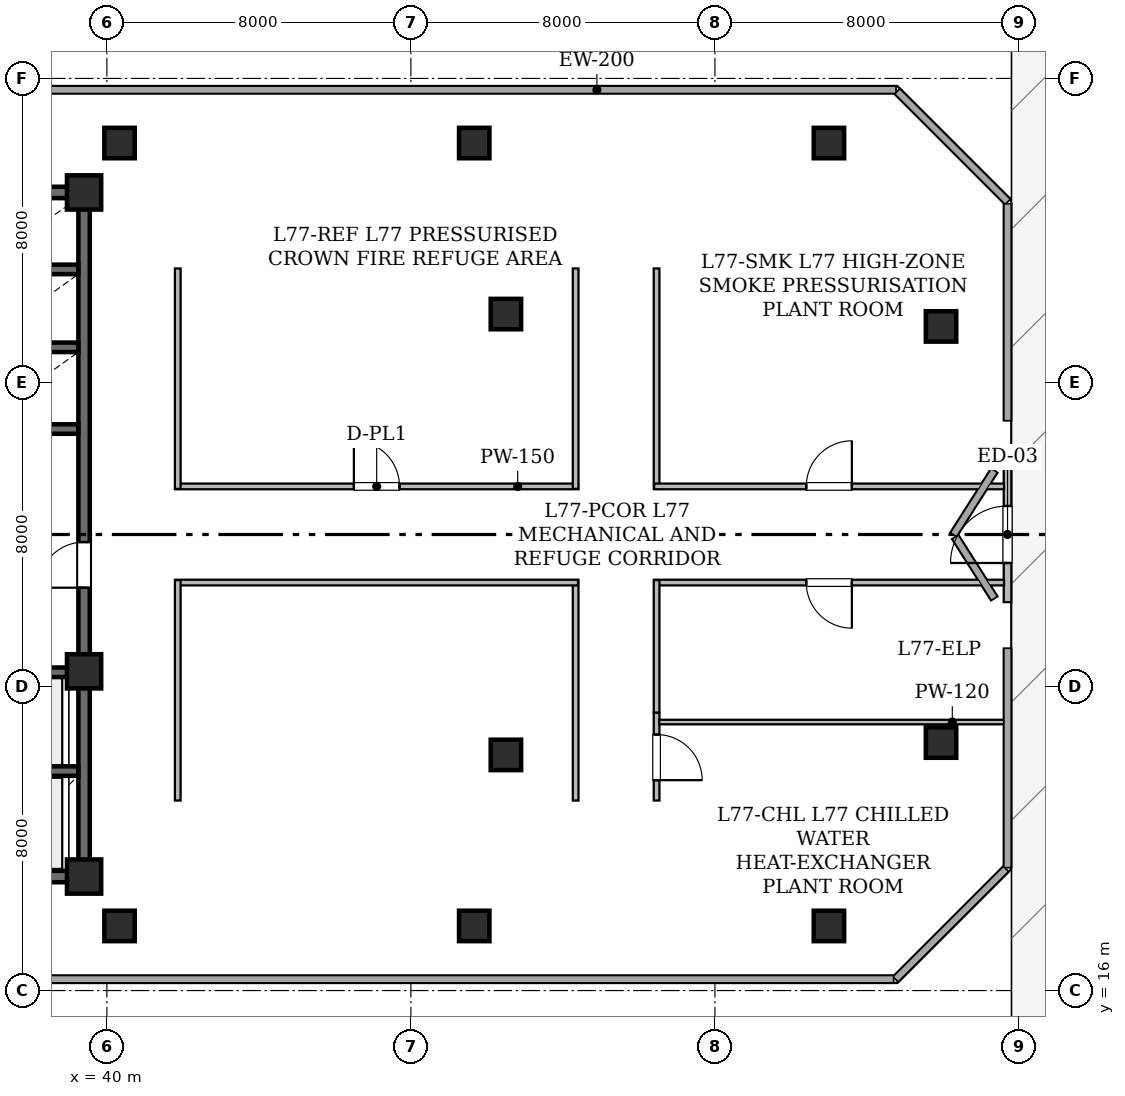
"""IFC4 building model, lengths in metres.
Left out: names, types, materials, properties, quantities, classifications, styles, units other than length and angle.
Written with IfcOpenShell. Run it as: python <this file> out.ifc"""

import sys

from ifc_helpers import new_model, si_unit, direction, frame, frame_2d, origin, origin_2d, place, context, subcontext, project, spatial, rectangle, hollow_rectangle, extrude, element, fill, save


model = new_model("IFC4")
c1 = context("Model", 3, precision=1e-05, world=origin(), true_north=direction((0.0, 1.0)))
c2 = subcontext(c1, "Body", "Model", "MODEL_VIEW")
j1 = project(units=[si_unit("LENGTHUNIT", "METRE"), si_unit("PLANEANGLEUNIT", "RADIAN")], contexts=[c1])
p1 = place(None, origin())
s1 = spatial("IfcSite", under=j1, at=p1, CompositionType="ELEMENT")
p2 = place(p1, origin())
s2 = spatial("IfcBuilding", under=s1, at=p2, CompositionType="ELEMENT")
p3 = place(p2, frame((0.0, 0.0, 303.05)))
s3 = spatial("IfcBuildingStorey", under=s2, at=p3, CompositionType="ELEMENT", Elevation=303.05)
for number, where, z_axis, x_axis in (
    (1, (39.4, 19.0, 0.0), (0.0, 0.0, 1.0), (1.0, 0.0, 0.0)),
    (2, (39.4, 24.4, 0.0), (0.0, 0.0, 1.0), (1.0, 0.0, 0.0)),
    (3, (39.4, 37.0, 0.0), (0.0, 0.0, 1.0), (1.0, 0.0, 0.0)),
):
    element("IfcColumn", number, at=place(p3, frame(where, z_axis=z_axis, x_axis=x_axis)), inside=s3, PredefinedType="COLUMN", context=c2, shape_type="SweptSolid", body=[
        extrude(hollow_rectangle(XDim=0.9, YDim=0.9, WallThickness=0.045, at=origin_2d()), origin(), (0.0, 0.0, 1.0), 4.8),
    ])
for number, where, z_axis, x_axis in (
    (4, (40.333, 17.7, 0.0), (0.0, 0.0, 1.0), (1.0, 0.0, 0.0)),
    (5, (49.667, 17.7, 0.0), (0.0, 0.0, 1.0), (1.0, 0.0, 0.0)),
    (6, (59.0, 17.7, 0.0), (0.0, 0.0, 1.0), (1.0, 0.0, 0.0)),
    (7, (40.333, 38.3, 0.0), (0.0, 0.0, 1.0), (1.0, 0.0, 0.0)),
    (8, (49.667, 38.3, 0.0), (0.0, 0.0, 1.0), (1.0, 0.0, 0.0)),
    (9, (59.0, 38.3, 0.0), (0.0, 0.0, 1.0), (1.0, 0.0, 0.0)),
    (10, (61.95, 22.525, 0.0), (0.0, 0.0, 1.0), (1.0, 0.0, 0.0)),
    (11, (61.95, 33.475, 0.0), (0.0, 0.0, 1.0), (1.0, 0.0, 0.0)),
    (12, (50.5, 22.2, 0.0), (0.0, 0.0, 1.0), (1.0, 0.0, 0.0)),
    (13, (50.5, 33.8, 0.0), (0.0, 0.0, 1.0), (1.0, 0.0, 0.0)),
):
    element("IfcColumn", number, at=place(p3, frame(where, z_axis=z_axis, x_axis=x_axis)), inside=s3, PredefinedType="COLUMN", context=c2, shape_type="SweptSolid", body=[
        extrude(hollow_rectangle(XDim=0.8, YDim=0.8, WallThickness=0.04, at=origin_2d()), origin(), (0.0, 0.0, 1.0), 4.8),
    ])
p4 = place(p3, frame((29.302, 39.7, 0.0), z_axis=(0.0, 0.0, 1.0), x_axis=(1.0, 0.0, 0.0)))
e14 = element("IfcWall", 14, at=p4, inside=s3, PredefinedType="STANDARD", context=c2, shape_type="SweptSolid", body=[
    extrude(rectangle(XDim=31.457, YDim=0.2, at=frame_2d((15.729, 0.0))), origin(), (0.0, 0.0, 1.0), 1.15),
])
p5 = place(p3, frame((60.803, 39.656, 0.0), z_axis=(0.0, 0.0, 1.0), x_axis=(0.707106781187, -0.707106781187, 0.0)))
e15 = element("IfcWall", 15, at=p5, inside=s3, PredefinedType="STANDARD", context=c2, shape_type="SweptSolid", body=[
    extrude(rectangle(XDim=4.097, YDim=0.2, at=frame_2d((2.048, 0.0))), origin(), (0.0, 0.0, 1.0), 1.15),
])
p6 = place(p3, frame((63.7, 36.696, 0.0), z_axis=(0.0, 0.0, 1.0), x_axis=(0.0, -1.0, 0.0)))
e16 = element("IfcWall", 16, at=p6, inside=s3, PredefinedType="STANDARD", context=c2, shape_type="SweptSolid", body=[
    extrude(rectangle(XDim=5.696, YDim=0.2, at=frame_2d((2.848, 0.0))), origin(), (0.0, 0.0, 1.0), 1.15),
])
p7 = place(p3, frame((63.35, 29.679, 0.0), z_axis=(0.0, 0.0, 1.0), x_axis=(-0.537113569059, -0.843509937068, 0.0)))
e17 = element("IfcWall", 17, at=p7, inside=s3, PredefinedType="STANDARD", context=c2, shape_type="SweptSolid", body=[
    extrude(rectangle(XDim=1.99, YDim=0.2, at=frame_2d((0.995, 0.0))), origin(), (0.0, 0.0, 1.0), 1.15),
])
p8 = place(p3, frame((62.325, 27.931, 0.0), z_axis=(0.0, 0.0, 1.0), x_axis=(0.537132057912, -0.843498163818, 0.0)))
e18 = element("IfcWall", 18, at=p8, inside=s3, PredefinedType="STANDARD", context=c2, shape_type="SweptSolid", body=[
    extrude(rectangle(XDim=1.908, YDim=0.2, at=frame_2d((0.954, 0.0))), origin(), (0.0, 0.0, 1.0), 1.15),
])
p9 = place(p3, frame((63.7, 25.0, 0.0), z_axis=(0.0, 0.0, 1.0), x_axis=(0.0, -1.0, 0.0)))
e19 = element("IfcWall", 19, at=p9, inside=s3, PredefinedType="STANDARD", context=c2, shape_type="SweptSolid", body=[
    extrude(rectangle(XDim=5.759, YDim=0.2, at=frame_2d((2.879, 0.0))), origin(), (0.0, 0.0, 1.0), 1.15),
])
p10 = place(p3, frame((63.655, 19.196, 0.0), z_axis=(0.0, 0.0, 1.0), x_axis=(-0.707106781187, -0.707106781187, 0.0)))
e20 = element("IfcWall", 20, at=p10, inside=s3, PredefinedType="STANDARD", context=c2, shape_type="SweptSolid", body=[
    extrude(rectangle(XDim=4.095, YDim=0.2, at=frame_2d((2.048, 0.0))), origin(), (0.0, 0.0, 1.0), 1.15),
])
p11 = place(p3, frame((60.696, 16.3, 0.0), z_axis=(0.0, 0.0, 1.0), x_axis=(-1.0, 0.0, 0.0)))
e21 = element("IfcWall", 21, at=p11, inside=s3, PredefinedType="STANDARD", context=c2, shape_type="SweptSolid", body=[
    extrude(rectangle(XDim=31.393, YDim=0.2, at=frame_2d((15.697, 0.0))), origin(), (0.0, 0.0, 1.0), 1.15),
])
p12 = place(p3, frame((63.7, 26.22, 0.0), z_axis=(0.0, 0.0, 1.0), x_axis=(0.0, 1.0, 0.0)))
e22 = element("IfcWall", 22, at=p12, inside=s3, PredefinedType="STANDARD", context=c2, shape_type="SweptSolid", body=[
    extrude(rectangle(XDim=3.56, YDim=0.2, at=frame_2d((1.78, 0.0))), origin(), (0.0, 0.0, 1.0), 4.55),
])
p13 = place(p12, frame((1.03, 0.0, 0.0)))
e23 = element("IfcOpeningElement", 23, at=p13, cuts=e22, PredefinedType="OPENING", context=c2, shape_type="SweptSolid", body=[
    extrude(rectangle(XDim=1.5, YDim=2.2, at=frame_2d((0.75, 1.1))), frame((0.0, 0.11, 0.0), z_axis=(0.0, -1.0, 0.0), x_axis=(1.0, 0.0, 0.0)), (0.0, 0.0, 1.0), 0.22),
])
p14 = place(p3, frame((29.0, 19.0, 0.0), z_axis=(0.0, 0.0, 1.0), x_axis=(1.0, 0.0, 0.0)))
e24 = element("IfcWall", 24, at=p14, inside=s3, PredefinedType="SHEAR", context=c2, shape_type="SweptSolid", body=[
    extrude(rectangle(XDim=10.4, YDim=0.3, at=frame_2d((5.2, 0.0))), origin(), (0.0, 0.0, 1.0), 4.55),
])
p15 = place(p14, frame((4.9, 0.0, 0.0)))
e25 = element("IfcOpeningElement", 25, at=p15, cuts=e24, PredefinedType="OPENING", context=c2, shape_type="SweptSolid", body=[
    extrude(rectangle(XDim=1.2, YDim=2.15, at=frame_2d((0.6, 1.075))), frame((0.0, 0.16, 0.0), z_axis=(0.0, -1.0, 0.0), x_axis=(1.0, 0.0, 0.0)), (0.0, 0.0, 1.0), 0.32),
])
p16 = place(p3, frame((29.0, 37.0, 0.0), z_axis=(0.0, 0.0, 1.0), x_axis=(1.0, 0.0, 0.0)))
e26 = element("IfcWall", 26, at=p16, inside=s3, PredefinedType="SHEAR", context=c2, shape_type="SweptSolid", body=[
    extrude(rectangle(XDim=10.4, YDim=0.3, at=frame_2d((5.2, 0.0))), origin(), (0.0, 0.0, 1.0), 4.55),
])
p17 = place(p16, frame((5.14, 0.0, 0.0)))
e27 = element("IfcOpeningElement", 27, at=p17, cuts=e26, PredefinedType="OPENING", context=c2, shape_type="SweptSolid", body=[
    extrude(rectangle(XDim=1.15, YDim=2.2, at=frame_2d((0.575, 1.1))), frame((0.0, 0.16, 0.0), z_axis=(0.0, -1.0, 0.0), x_axis=(1.0, 0.0, 0.0)), (0.0, 0.0, 1.0), 0.32),
])
p18 = place(p3, frame((39.4, 19.0, 0.0), z_axis=(0.0, 0.0, 1.0), x_axis=(0.0, 1.0, 0.0)))
e28 = element("IfcWall", 28, at=p18, inside=s3, PredefinedType="SHEAR", context=c2, shape_type="SweptSolid", body=[
    extrude(rectangle(XDim=5.4, YDim=0.3, at=frame_2d((2.7, 0.0))), origin(), (0.0, 0.0, 1.0), 4.55),
])
p19 = place(p3, frame((39.4, 24.4, 0.0), z_axis=(0.0, 0.0, 1.0), x_axis=(0.0, 1.0, 0.0)))
e29 = element("IfcWall", 29, at=p19, inside=s3, PredefinedType="SHEAR", context=c2, shape_type="SweptSolid", body=[
    extrude(rectangle(XDim=12.6, YDim=0.3, at=frame_2d((6.3, 0.0))), origin(), (0.0, 0.0, 1.0), 4.55),
])
p20 = place(p19, frame((2.2, 0.0, 0.0)))
e30 = element("IfcOpeningElement", 30, at=p20, cuts=e29, PredefinedType="OPENING", context=c2, shape_type="SweptSolid", body=[
    extrude(rectangle(XDim=1.2, YDim=2.15, at=frame_2d((0.6, 1.075))), frame((0.0, 0.16, 0.0), z_axis=(0.0, -1.0, 0.0), x_axis=(1.0, 0.0, 0.0)), (0.0, 0.0, 1.0), 0.32),
])
for number, where, z_axis, x_axis in (
    (31, (36.604, 21.775, 0.0), (0.0, 0.0, 1.0), (1.0, 0.0, 0.0)),
    (32, (36.604, 24.375, 0.0), (0.0, 0.0, 1.0), (1.0, 0.0, 0.0)),
):
    element("IfcWall", number, at=place(p3, frame(where, z_axis=z_axis, x_axis=x_axis)), inside=s3, PredefinedType="SHEAR", context=c2, shape_type="SweptSolid", body=[
        extrude(rectangle(XDim=2.642, YDim=0.25, at=frame_2d((1.321, 0.0))), origin(), (0.0, 0.0, 1.0), 4.55),
    ])
p21 = place(p3, frame((36.904, 30.775, 0.0), z_axis=(0.0, 0.0, 1.0), x_axis=(1.0, 0.0, 0.0)))
e33 = element("IfcWall", 33, at=p21, inside=s3, PredefinedType="SHEAR", context=c2, shape_type="SweptSolid", body=[
    extrude(rectangle(XDim=2.342, YDim=0.25, at=frame_2d((1.171, 0.0))), origin(), (0.0, 0.0, 1.0), 4.55),
])
for number, where, z_axis, x_axis in (
    (34, (36.604, 32.925, 0.0), (0.0, 0.0, 1.0), (1.0, 0.0, 0.0)),
    (35, (36.604, 34.975, 0.0), (0.0, 0.0, 1.0), (1.0, 0.0, 0.0)),
):
    element("IfcWall", number, at=place(p3, frame(where, z_axis=z_axis, x_axis=x_axis)), inside=s3, PredefinedType="SHEAR", context=c2, shape_type="SweptSolid", body=[
        extrude(rectangle(XDim=2.642, YDim=0.25, at=frame_2d((1.321, 0.0))), origin(), (0.0, 0.0, 1.0), 4.55),
    ])
p22 = place(p3, frame((41.8, 29.265, 0.0), z_axis=(0.0, 0.0, 1.0), x_axis=(1.0, 0.0, 0.0)))
e36 = element("IfcWall", 36, at=p22, inside=s3, PredefinedType="STANDARD", context=c2, shape_type="SweptSolid", body=[
    extrude(rectangle(XDim=10.6, YDim=0.15, at=frame_2d((5.3, 0.0))), origin(), (0.0, 0.0, 1.0), 3.845),
])
p23 = place(p22, frame((4.7, 0.0, 0.0)))
e37 = element("IfcOpeningElement", 37, at=p23, cuts=e36, PredefinedType="OPENING", context=c2, shape_type="SweptSolid", body=[
    extrude(rectangle(XDim=1.2, YDim=2.15, at=frame_2d((0.6, 1.075))), frame((0.0, 0.085, 0.0), z_axis=(0.0, -1.0, 0.0), x_axis=(1.0, 0.0, 0.0)), (0.0, 0.0, 1.0), 0.17),
])
for number, where, z_axis, x_axis in (
    (38, (52.335, 29.2, 0.0), (0.0, 0.0, 1.0), (0.0, 1.0, 0.0)),
    (39, (52.335, 21.0, 0.0), (0.0, 0.0, 1.0), (0.0, 1.0, 0.0)),
):
    element("IfcWall", number, at=place(p3, frame(where, z_axis=z_axis, x_axis=x_axis)), inside=s3, PredefinedType="STANDARD", context=c2, shape_type="SweptSolid", body=[
        extrude(rectangle(XDim=5.8, YDim=0.15, at=frame_2d((2.9, 0.0))), origin(), (0.0, 0.0, 1.0), 3.845),
    ])
p24 = place(p3, frame((52.398, 26.735, 0.0), z_axis=(0.0, 0.0, 1.0), x_axis=(-1.0, 0.0, 0.0)))
e40 = element("IfcWall", 40, at=p24, inside=s3, PredefinedType="STANDARD", context=c2, shape_type="SweptSolid", body=[
    extrude(rectangle(XDim=10.598, YDim=0.15, at=frame_2d((5.299, 0.0))), origin(), (0.0, 0.0, 1.0), 3.845),
])
p25 = place(p3, frame((41.865, 26.8, 0.0), z_axis=(0.0, 0.0, 1.0), x_axis=(0.0, -1.0, 0.0)))
e41 = element("IfcWall", 41, at=p25, inside=s3, PredefinedType="STANDARD", context=c2, shape_type="SweptSolid", body=[
    extrude(rectangle(XDim=5.8, YDim=0.15, at=frame_2d((2.9, 0.0))), origin(), (0.0, 0.0, 1.0), 3.845),
])
p26 = place(p3, frame((41.865, 35.0, 0.0), z_axis=(0.0, 0.0, 1.0), x_axis=(0.0, -1.0, 0.0)))
e42 = element("IfcWall", 42, at=p26, inside=s3, PredefinedType="STANDARD", context=c2, shape_type="SweptSolid", body=[
    extrude(rectangle(XDim=5.8, YDim=0.15, at=frame_2d((2.9, 0.0))), origin(), (0.0, 0.0, 1.0), 4.55),
])
p27 = place(p3, frame((54.465, 23.314, 0.0), z_axis=(0.0, 0.0, 1.0), x_axis=(0.0, -1.0, 0.0)))
e43 = element("IfcWall", 43, at=p27, inside=s3, PredefinedType="STANDARD", context=c2, shape_type="SweptSolid", body=[
    extrude(rectangle(XDim=2.314, YDim=0.15, at=frame_2d((1.157, 0.0))), origin(), (0.0, 0.0, 1.0), 3.845),
])
p28 = place(p27, frame((0.578, 0.0, 0.0)))
e44 = element("IfcOpeningElement", 44, at=p28, cuts=e43, PredefinedType="OPENING", context=c2, shape_type="SweptSolid", body=[
    extrude(rectangle(XDim=1.2, YDim=2.15, at=frame_2d((0.6, 1.075))), frame((0.0, 0.085, 0.0), z_axis=(0.0, -1.0, 0.0), x_axis=(1.0, 0.0, 0.0)), (0.0, 0.0, 1.0), 0.17),
])
p29 = place(p3, frame((63.608, 26.735, 0.0), z_axis=(0.0, 0.0, 1.0), x_axis=(-1.0, 0.0, 0.0)))
e45 = element("IfcWall", 45, at=p29, inside=s3, PredefinedType="STANDARD", context=c2, shape_type="SweptSolid", body=[
    extrude(rectangle(XDim=9.208, YDim=0.15, at=frame_2d((4.604, 0.0))), origin(), (0.0, 0.0, 1.0), 4.007),
])
p30 = place(p29, frame((4.004, 0.0, 0.0)))
e46 = element("IfcOpeningElement", 46, at=p30, cuts=e45, PredefinedType="OPENING", context=c2, shape_type="SweptSolid", body=[
    extrude(rectangle(XDim=1.2, YDim=2.15, at=frame_2d((0.6, 1.075))), frame((0.0, 0.085, 0.0), z_axis=(0.0, -1.0, 0.0), x_axis=(1.0, 0.0, 0.0)), (0.0, 0.0, 1.0), 0.17),
])
p31 = place(p3, frame((54.465, 26.8, 0.0), z_axis=(0.0, 0.0, 1.0), x_axis=(0.0, -1.0, 0.0)))
e47 = element("IfcWall", 47, at=p31, inside=s3, PredefinedType="STANDARD", context=c2, shape_type="SweptSolid", body=[
    extrude(rectangle(XDim=3.486, YDim=0.15, at=frame_2d((1.743, 0.0))), origin(), (0.0, 0.0, 1.0), 4.55),
])
p32 = place(p3, frame((54.465, 35.0, 0.0), z_axis=(0.0, 0.0, 1.0), x_axis=(0.0, -1.0, 0.0)))
e48 = element("IfcWall", 48, at=p32, inside=s3, PredefinedType="STANDARD", context=c2, shape_type="SweptSolid", body=[
    extrude(rectangle(XDim=5.8, YDim=0.15, at=frame_2d((2.9, 0.0))), origin(), (0.0, 0.0, 1.0), 3.845),
])
p33 = place(p3, frame((54.4, 29.265, 0.0), z_axis=(0.0, 0.0, 1.0), x_axis=(1.0, 0.0, 0.0)))
e49 = element("IfcWall", 49, at=p33, inside=s3, PredefinedType="STANDARD", context=c2, shape_type="SweptSolid", body=[
    extrude(rectangle(XDim=9.208, YDim=0.15, at=frame_2d((4.604, 0.0))), origin(), (0.0, 0.0, 1.0), 4.007),
])
p34 = place(p33, frame((4.004, 0.0, 0.0)))
e50 = element("IfcOpeningElement", 50, at=p34, cuts=e49, PredefinedType="OPENING", context=c2, shape_type="SweptSolid", body=[
    extrude(rectangle(XDim=1.2, YDim=2.15, at=frame_2d((0.6, 1.075))), frame((0.0, 0.085, 0.0), z_axis=(0.0, -1.0, 0.0), x_axis=(1.0, 0.0, 0.0)), (0.0, 0.0, 1.0), 0.17),
])
p35 = place(p3, frame((54.532, 23.065, 0.0), z_axis=(0.0, 0.0, 1.0), x_axis=(1.0, 0.0, 0.0)))
e51 = element("IfcWall", 51, at=p35, inside=s3, PredefinedType="PARTITIONING", context=c2, shape_type="SweptSolid", body=[
    extrude(rectangle(XDim=9.076, YDim=0.12, at=frame_2d((4.538, 0.0))), origin(), (0.0, 0.0, 1.0), 4.007),
])
p36 = place(p13, origin())
e52 = element("IfcDoor", 52, at=p36, inside=s3, OperationType="SINGLE_SWING_LEFT", PredefinedType="DOOR", context=c2, shape_type="SweptSolid", body=[
    extrude(rectangle(XDim=1.5, YDim=2.2, at=frame_2d((0.75, 1.1))), frame((0.0, 0.025, 0.0), z_axis=(0.0, -1.0, 0.0), x_axis=(1.0, 0.0, 0.0)), (0.0, 0.0, 1.0), 0.05),
])
fill(e23, e52)
p37 = place(p20, origin())
e53 = element("IfcDoor", 53, at=p37, inside=s3, OperationType="SINGLE_SWING_LEFT", PredefinedType="DOOR", context=c2, shape_type="SweptSolid", body=[
    extrude(rectangle(XDim=1.2, YDim=2.15, at=frame_2d((0.6, 1.075))), frame((0.0, 0.025, 0.0), z_axis=(0.0, -1.0, 0.0), x_axis=(1.0, 0.0, 0.0)), (0.0, 0.0, 1.0), 0.05),
])
fill(e30, e53)
p38 = place(p23, origin())
e54 = element("IfcDoor", 54, at=p38, inside=s3, OperationType="SINGLE_SWING_LEFT", PredefinedType="DOOR", context=c2, shape_type="SweptSolid", body=[
    extrude(rectangle(XDim=1.2, YDim=2.15, at=frame_2d((0.6, 1.075))), frame((0.0, 0.025, 0.0), z_axis=(0.0, -1.0, 0.0), x_axis=(1.0, 0.0, 0.0)), (0.0, 0.0, 1.0), 0.05),
])
fill(e37, e54)
p39 = place(p28, origin())
e55 = element("IfcDoor", 55, at=p39, inside=s3, OperationType="SINGLE_SWING_RIGHT", PredefinedType="DOOR", context=c2, shape_type="SweptSolid", body=[
    extrude(rectangle(XDim=1.2, YDim=2.15, at=frame_2d((0.6, 1.075))), frame((0.0, 0.025, 0.0), z_axis=(0.0, -1.0, 0.0), x_axis=(1.0, 0.0, 0.0)), (0.0, 0.0, 1.0), 0.05),
])
fill(e44, e55)
p40 = place(p30, origin())
e56 = element("IfcDoor", 56, at=p40, inside=s3, OperationType="SINGLE_SWING_LEFT", PredefinedType="DOOR", context=c2, shape_type="SweptSolid", body=[
    extrude(rectangle(XDim=1.2, YDim=2.15, at=frame_2d((0.6, 1.075))), frame((0.0, 0.025, 0.0), z_axis=(0.0, -1.0, 0.0), x_axis=(1.0, 0.0, 0.0)), (0.0, 0.0, 1.0), 0.05),
])
fill(e46, e56)
p41 = place(p34, origin())
e57 = element("IfcDoor", 57, at=p41, inside=s3, OperationType="SINGLE_SWING_RIGHT", PredefinedType="DOOR", context=c2, shape_type="SweptSolid", body=[
    extrude(rectangle(XDim=1.2, YDim=2.15, at=frame_2d((0.6, 1.075))), frame((0.0, 0.025, 0.0), z_axis=(0.0, -1.0, 0.0), x_axis=(1.0, 0.0, 0.0)), (0.0, 0.0, 1.0), 0.05),
])
fill(e50, e57)
save(model, sys.argv[1])
